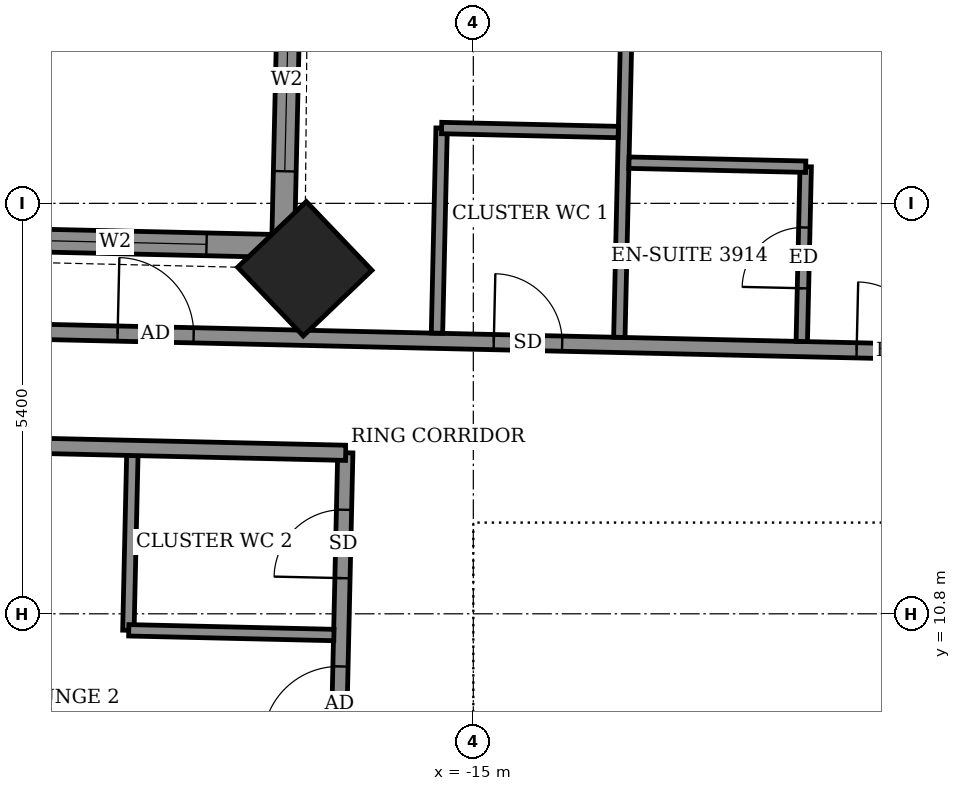
"""IFC4 building model, lengths in metres.
Left out: names, types, materials, properties, quantities, classifications, styles, units other than length and angle.
Written with IfcOpenShell. Run it as: python <this file> out.ifc"""

import sys

from ifc_helpers import new_model, si_unit, direction, frame, frame_2d, origin, origin_2d, place, context, subcontext, project, spatial, rectangle, extrude, element, fill, save


model = new_model("IFC4")
c1 = context("Model", 3, precision=1e-05, world=origin(), true_north=direction((0.0, 1.0)))
c2 = subcontext(c1, "Body", "Model", "MODEL_VIEW")
j1 = project(units=[si_unit("LENGTHUNIT", "METRE"), si_unit("PLANEANGLEUNIT", "RADIAN")], contexts=[c1])
p1 = place(None, origin())
s1 = spatial("IfcSite", under=j1, at=p1, CompositionType="ELEMENT")
p2 = place(p1, origin())
s2 = spatial("IfcBuilding", under=s1, at=p2, CompositionType="ELEMENT")
p3 = place(p2, frame((0.0, 0.0, 156.3)))
s3 = spatial("IfcBuildingStorey", under=s2, at=p3, CompositionType="ELEMENT", Elevation=156.3)
p4 = place(p3, frame((-17.217, 15.339, -0.55), z_axis=(0.0, 0.0, 1.0), x_axis=(-0.722976563275, -0.690872556232, 0.0)))
e1 = element("IfcColumn", 1, at=p4, inside=s3, PredefinedType="COLUMN", context=c2, shape_type="SweptSolid", body=[
    extrude(rectangle(XDim=1.25, YDim=1.25, at=origin_2d()), origin(), (0.0, 0.0, 1.0), 3.6),
])
p5 = place(p3, frame((-17.389, 20.637, 0.0), z_axis=(0.0, 0.0, 1.0), x_axis=(-0.022801259434, -0.999740017489, 0.0)))
e2 = element("IfcWall", 2, at=p5, inside=s3, PredefinedType="SOLIDWALL", context=c2, shape_type="SweptSolid", body=[
    extrude(rectangle(XDim=5.0, YDim=0.3, at=frame_2d((2.5, 0.0))), origin(), (0.0, 0.0, 1.0), 2.55),
])
p6 = place(p5, frame((1.616, 0.0, 0.9)))
e3 = element("IfcOpeningElement", 3, at=p6, cuts=e2, PredefinedType="OPENING", context=c2, shape_type="SweptSolid", body=[
    extrude(rectangle(XDim=2.4, YDim=1.5, at=frame_2d((1.2, 0.75))), frame((0.0, 0.16, 0.0), z_axis=(0.0, -1.0, 0.0), x_axis=(1.0, 0.0, 0.0)), (0.0, 0.0, 1.0), 0.32),
])
p7 = place(p3, frame((-17.503, 15.638, 0.0), z_axis=(0.0, 0.0, 1.0), x_axis=(-0.999744350543, 0.022610474516, 0.0)))
e4 = element("IfcWall", 4, at=p7, inside=s3, PredefinedType="SOLIDWALL", context=c2, shape_type="SweptSolid", body=[
    extrude(rectangle(XDim=4.999, YDim=0.3, at=frame_2d((2.5, 0.0))), origin(), (0.0, 0.0, 1.0), 2.55),
])
p8 = place(p7, frame((1.007, 0.0, 0.9)))
e5 = element("IfcOpeningElement", 5, at=p8, cuts=e4, PredefinedType="OPENING", context=c2, shape_type="SweptSolid", body=[
    extrude(rectangle(XDim=2.4, YDim=1.5, at=frame_2d((1.2, 0.75))), frame((0.0, 0.16, 0.0), z_axis=(0.0, -1.0, 0.0), x_axis=(1.0, 0.0, 0.0)), (0.0, 0.0, 1.0), 0.32),
])
p9 = place(p3, frame((-17.32, -15.098, 0.0), z_axis=(0.0, 0.0, 1.0), x_axis=(0.022694293906, 0.999742451346, 0.0)))
e6 = element("IfcWall", 6, at=p9, inside=s3, PredefinedType="PARTITIONING", context=c2, shape_type="SweptSolid", body=[
    extrude(rectangle(XDim=28.024, YDim=0.2, at=frame_2d((14.012, 0.0))), origin(), (0.0, 0.0, 1.0), 3.05),
])
p10 = place(p9, frame((24.212, 0.0, 0.0)))
e7 = element("IfcOpeningElement", 7, at=p10, cuts=e6, PredefinedType="OPENING", context=c2, shape_type="SweptSolid", body=[
    extrude(rectangle(XDim=1.0, YDim=2.1, at=frame_2d((0.5, 1.05))), frame((0.0, 0.11, 0.0), z_axis=(0.0, -1.0, 0.0), x_axis=(1.0, 0.0, 0.0)), (0.0, 0.0, 1.0), 0.22),
])
p11 = place(p9, frame((26.374, 0.0, 0.0)))
e8 = element("IfcOpeningElement", 8, at=p11, cuts=e6, PredefinedType="OPENING", context=c2, shape_type="SweptSolid", body=[
    extrude(rectangle(XDim=0.9, YDim=2.1, at=frame_2d((0.45, 1.05))), frame((0.0, 0.11, 0.0), z_axis=(0.0, -1.0, 0.0), x_axis=(1.0, 0.0, 0.0)), (0.0, 0.0, 1.0), 0.22),
])
p12 = place(p9, frame((21.774, 0.0, 0.0)))
e9 = element("IfcOpeningElement", 9, at=p12, cuts=e6, PredefinedType="OPENING", context=c2, shape_type="SweptSolid", body=[
    extrude(rectangle(XDim=1.0, YDim=2.1, at=frame_2d((0.5, 1.05))), frame((0.0, 0.11, 0.0), z_axis=(0.0, -1.0, 0.0), x_axis=(1.0, 0.0, 0.0)), (0.0, 0.0, 1.0), 0.22),
])
p13 = place(p9, frame((18.65, 0.0, 0.0)))
e10 = element("IfcOpeningElement", 10, at=p13, cuts=e6, PredefinedType="OPENING", context=c2, shape_type="SweptSolid", body=[
    extrude(rectangle(XDim=1.0, YDim=2.1, at=frame_2d((0.5, 1.05))), frame((0.0, 0.11, 0.0), z_axis=(0.0, -1.0, 0.0), x_axis=(1.0, 0.0, 0.0)), (0.0, 0.0, 1.0), 0.22),
])
p14 = place(p9, frame((15.626, 0.0, 0.0)))
e11 = element("IfcOpeningElement", 11, at=p14, cuts=e6, PredefinedType="OPENING", context=c2, shape_type="SweptSolid", body=[
    extrude(rectangle(XDim=1.0, YDim=2.1, at=frame_2d((0.5, 1.05))), frame((0.0, 0.11, 0.0), z_axis=(0.0, -1.0, 0.0), x_axis=(1.0, 0.0, 0.0)), (0.0, 0.0, 1.0), 0.22),
])
p15 = place(p9, frame((12.557, 0.0, 0.0)))
e12 = element("IfcOpeningElement", 12, at=p15, cuts=e6, PredefinedType="OPENING", context=c2, shape_type="SweptSolid", body=[
    extrude(rectangle(XDim=1.0, YDim=2.1, at=frame_2d((0.5, 1.05))), frame((0.0, 0.11, 0.0), z_axis=(0.0, -1.0, 0.0), x_axis=(1.0, 0.0, 0.0)), (0.0, 0.0, 1.0), 0.22),
])
p16 = place(p9, frame((10.049, 0.0, 0.0)))
e13 = element("IfcOpeningElement", 13, at=p16, cuts=e6, PredefinedType="OPENING", context=c2, shape_type="SweptSolid", body=[
    extrude(rectangle(XDim=1.0, YDim=2.1, at=frame_2d((0.5, 1.05))), frame((0.0, 0.11, 0.0), z_axis=(0.0, -1.0, 0.0), x_axis=(1.0, 0.0, 0.0)), (0.0, 0.0, 1.0), 0.22),
])
p17 = place(p9, frame((7.849, 0.0, 0.0)))
e14 = element("IfcOpeningElement", 14, at=p17, cuts=e6, PredefinedType="OPENING", context=c2, shape_type="SweptSolid", body=[
    extrude(rectangle(XDim=0.9, YDim=2.1, at=frame_2d((0.45, 1.05))), frame((0.0, 0.11, 0.0), z_axis=(0.0, -1.0, 0.0), x_axis=(1.0, 0.0, 0.0)), (0.0, 0.0, 1.0), 0.22),
])
p18 = place(p9, frame((4.199, 0.0, 0.0)))
e15 = element("IfcOpeningElement", 15, at=p18, cuts=e6, PredefinedType="OPENING", context=c2, shape_type="SweptSolid", body=[
    extrude(rectangle(XDim=1.0, YDim=2.1, at=frame_2d((0.5, 1.05))), frame((0.0, 0.11, 0.0), z_axis=(0.0, -1.0, 0.0), x_axis=(1.0, 0.0, 0.0)), (0.0, 0.0, 1.0), 0.22),
])
p19 = place(p9, frame((0.75, 0.0, 0.0)))
e16 = element("IfcOpeningElement", 16, at=p19, cuts=e6, PredefinedType="OPENING", context=c2, shape_type="SweptSolid", body=[
    extrude(rectangle(XDim=0.9, YDim=2.1, at=frame_2d((0.45, 1.05))), frame((0.0, 0.11, 0.0), z_axis=(0.0, -1.0, 0.0), x_axis=(1.0, 0.0, 0.0)), (0.0, 0.0, 1.0), 0.22),
])
p20 = place(p3, frame((-19.538, 10.583, 0.0), z_axis=(0.0, 0.0, 1.0), x_axis=(0.022612884682, 0.999744296031, 0.0)))
e17 = element("IfcWall", 17, at=p20, inside=s3, PredefinedType="PARTITIONING", context=c2, shape_type="SweptSolid", body=[
    extrude(rectangle(XDim=2.3, YDim=0.15, at=frame_2d((1.15, 0.0))), origin(), (0.0, 0.0, 1.0), 3.05),
])
p21 = place(p3, frame((-19.533, 10.583, 0.0), z_axis=(0.0, 0.0, 1.0), x_axis=(0.999736155505, -0.022969966847, 0.0)))
e18 = element("IfcWall", 18, at=p21, inside=s3, PredefinedType="PARTITIONING", context=c2, shape_type="SweptSolid", body=[
    extrude(rectangle(XDim=2.7, YDim=0.15, at=frame_2d((1.35, 0.0))), origin(), (0.0, 0.0, 1.0), 3.05),
])
p22 = place(p3, frame((-21.313, 13.024, 0.0), z_axis=(0.0, 0.0, 1.0), x_axis=(0.999738699021, -0.022858995594, 0.0)))
e19 = element("IfcWall", 19, at=p22, inside=s3, PredefinedType="PARTITIONING", context=c2, shape_type="SweptSolid", body=[
    extrude(rectangle(XDim=4.635, YDim=0.2, at=frame_2d((2.318, 0.0))), origin(), (0.0, 0.0, 1.0), 3.05),
])
p23 = place(p3, frame((-21.279, 14.523, 0.0), z_axis=(0.0, 0.0, 1.0), x_axis=(0.999742669174, -0.02268469602, 0.0)))
e20 = element("IfcWall", 20, at=p23, inside=s3, PredefinedType="PARTITIONING", context=c2, shape_type="SweptSolid", body=[
    extrude(rectangle(XDim=40.639, YDim=0.2, at=frame_2d((20.319, 0.0))), origin(), (0.0, 0.0, 1.0), 3.05),
])
p24 = place(p23, frame((37.65, 0.0, 0.0)))
e21 = element("IfcOpeningElement", 21, at=p24, cuts=e20, PredefinedType="OPENING", context=c2, shape_type="SweptSolid", body=[
    extrude(rectangle(XDim=0.9, YDim=2.1, at=frame_2d((0.45, 1.05))), frame((0.0, 0.11, 0.0), z_axis=(0.0, -1.0, 0.0), x_axis=(1.0, 0.0, 0.0)), (0.0, 0.0, 1.0), 0.22),
])
p25 = place(p23, frame((32.775, 0.0, 0.0)))
e22 = element("IfcOpeningElement", 22, at=p25, cuts=e20, PredefinedType="OPENING", context=c2, shape_type="SweptSolid", body=[
    extrude(rectangle(XDim=0.9, YDim=2.1, at=frame_2d((0.45, 1.05))), frame((0.0, 0.11, 0.0), z_axis=(0.0, -1.0, 0.0), x_axis=(1.0, 0.0, 0.0)), (0.0, 0.0, 1.0), 0.22),
])
p26 = place(p23, frame((30.4, 0.0, 0.0)))
e23 = element("IfcOpeningElement", 23, at=p26, cuts=e20, PredefinedType="OPENING", context=c2, shape_type="SweptSolid", body=[
    extrude(rectangle(XDim=0.9, YDim=2.1, at=frame_2d((0.45, 1.05))), frame((0.0, 0.11, 0.0), z_axis=(0.0, -1.0, 0.0), x_axis=(1.0, 0.0, 0.0)), (0.0, 0.0, 1.0), 0.22),
])
p27 = place(p23, frame((23.225, 0.0, 0.0)))
e24 = element("IfcOpeningElement", 24, at=p27, cuts=e20, PredefinedType="OPENING", context=c2, shape_type="SweptSolid", body=[
    extrude(rectangle(XDim=0.9, YDim=2.1, at=frame_2d((0.45, 1.05))), frame((0.0, 0.11, 0.0), z_axis=(0.0, -1.0, 0.0), x_axis=(1.0, 0.0, 0.0)), (0.0, 0.0, 1.0), 0.22),
])
p28 = place(p23, frame((20.85, 0.0, 0.0)))
e25 = element("IfcOpeningElement", 25, at=p28, cuts=e20, PredefinedType="OPENING", context=c2, shape_type="SweptSolid", body=[
    extrude(rectangle(XDim=0.9, YDim=2.1, at=frame_2d((0.45, 1.05))), frame((0.0, 0.11, 0.0), z_axis=(0.0, -1.0, 0.0), x_axis=(1.0, 0.0, 0.0)), (0.0, 0.0, 1.0), 0.22),
])
p29 = place(p23, frame((13.675, 0.0, 0.0)))
e26 = element("IfcOpeningElement", 26, at=p29, cuts=e20, PredefinedType="OPENING", context=c2, shape_type="SweptSolid", body=[
    extrude(rectangle(XDim=0.9, YDim=2.1, at=frame_2d((0.45, 1.05))), frame((0.0, 0.11, 0.0), z_axis=(0.0, -1.0, 0.0), x_axis=(1.0, 0.0, 0.0)), (0.0, 0.0, 1.0), 0.22),
])
p30 = place(p23, frame((11.325, 0.0, 0.0)))
e27 = element("IfcOpeningElement", 27, at=p30, cuts=e20, PredefinedType="OPENING", context=c2, shape_type="SweptSolid", body=[
    extrude(rectangle(XDim=0.9, YDim=2.1, at=frame_2d((0.45, 1.05))), frame((0.0, 0.11, 0.0), z_axis=(0.0, -1.0, 0.0), x_axis=(1.0, 0.0, 0.0)), (0.0, 0.0, 1.0), 0.22),
])
p31 = place(p23, frame((1.6, 0.0, 0.0)))
e28 = element("IfcOpeningElement", 28, at=p31, cuts=e20, PredefinedType="OPENING", context=c2, shape_type="SweptSolid", body=[
    extrude(rectangle(XDim=1.0, YDim=2.1, at=frame_2d((0.5, 1.05))), frame((0.0, 0.11, 0.0), z_axis=(0.0, -1.0, 0.0), x_axis=(1.0, 0.0, 0.0)), (0.0, 0.0, 1.0), 0.22),
])
p32 = place(p23, frame((6.55, 0.0, 0.0)))
e29 = element("IfcOpeningElement", 29, at=p32, cuts=e20, PredefinedType="OPENING", context=c2, shape_type="SweptSolid", body=[
    extrude(rectangle(XDim=0.9, YDim=2.1, at=frame_2d((0.45, 1.05))), frame((0.0, 0.11, 0.0), z_axis=(0.0, -1.0, 0.0), x_axis=(1.0, 0.0, 0.0)), (0.0, 0.0, 1.0), 0.22),
])
p33 = place(p3, frame((-15.478, 14.492, 0.0), z_axis=(0.0, 0.0, 1.0), x_axis=(0.02260842146, 0.999744396973, 0.0)))
e30 = element("IfcWall", 30, at=p33, inside=s3, PredefinedType="PARTITIONING", context=c2, shape_type="SweptSolid", body=[
    extrude(rectangle(XDim=2.7, YDim=0.15, at=frame_2d((1.35, 0.0))), origin(), (0.0, 0.0, 1.0), 3.05),
])
p34 = place(p3, frame((-13.079, 14.437, 0.0), z_axis=(0.0, 0.0, 1.0), x_axis=(0.022688785847, 0.999742576365, 0.0)))
e31 = element("IfcWall", 31, at=p34, inside=s3, PredefinedType="PARTITIONING", context=c2, shape_type="SweptSolid", body=[
    extrude(rectangle(XDim=5.95, YDim=0.15, at=frame_2d((2.975, 0.0))), origin(), (0.0, 0.0, 1.0), 2.55),
])
p35 = place(p3, frame((-10.679, 14.383, 0.0), z_axis=(0.0, 0.0, 1.0), x_axis=(0.022615284993, 0.999744241736, 0.0)))
e32 = element("IfcWall", 32, at=p35, inside=s3, PredefinedType="PARTITIONING", context=c2, shape_type="SweptSolid", body=[
    extrude(rectangle(XDim=2.299, YDim=0.15, at=frame_2d((1.15, 0.0))), origin(), (0.0, 0.0, 1.0), 3.05),
])
p36 = place(p35, frame((0.7, 0.0, 0.0)))
e33 = element("IfcOpeningElement", 33, at=p36, cuts=e32, PredefinedType="OPENING", context=c2, shape_type="SweptSolid", body=[
    extrude(rectangle(XDim=0.8, YDim=2.1, at=frame_2d((0.4, 1.05))), frame((0.0, 0.085, 0.0), z_axis=(0.0, -1.0, 0.0), x_axis=(1.0, 0.0, 0.0)), (0.0, 0.0, 1.0), 0.17),
])
p37 = place(p3, frame((-12.952, 16.735, 0.0), z_axis=(0.0, 0.0, 1.0), x_axis=(0.999738082346, -0.022885950011, 0.0)))
e34 = element("IfcWall", 34, at=p37, inside=s3, PredefinedType="PARTITIONING", context=c2, shape_type="SweptSolid", body=[
    extrude(rectangle(XDim=2.325, YDim=0.15, at=frame_2d((1.163, 0.0))), origin(), (0.0, 0.0, 1.0), 3.05),
])
p38 = place(p3, frame((-15.417, 17.191, 0.0), z_axis=(0.0, 0.0, 1.0), x_axis=(0.999740260747, -0.02279059109, 0.0)))
e35 = element("IfcWall", 35, at=p38, inside=s3, PredefinedType="PARTITIONING", context=c2, shape_type="SweptSolid", body=[
    extrude(rectangle(XDim=2.324, YDim=0.15, at=frame_2d((1.162, 0.0))), origin(), (0.0, 0.0, 1.0), 3.05),
])
p39 = place(p3, frame((-14.7, 11.25, 0.0), z_axis=(0.0, 0.0, 1.0), x_axis=(1.0, 0.0, 0.0)))
e36 = element("IfcWall", 36, at=p39, inside=s3, PredefinedType="SHEAR", context=c2, shape_type="SweptSolid", body=[
    extrude(rectangle(XDim=29.4, YDim=0.9, at=frame_2d((14.7, 0.0))), origin(), (0.0, 0.0, 1.0), 3.6),
])
p40 = place(p3, frame((-14.25, -10.8, 0.0), z_axis=(0.0, 0.0, 1.0), x_axis=(0.0, 1.0, 0.0)))
e37 = element("IfcWall", 37, at=p40, inside=s3, PredefinedType="SHEAR", context=c2, shape_type="SweptSolid", body=[
    extrude(rectangle(XDim=21.6, YDim=0.9, at=frame_2d((10.8, 0.0))), origin(), (0.0, 0.0, 1.0), 3.6),
])
p41 = place(p40, frame((8.25, 0.0, 0.0)))
e38 = element("IfcOpeningElement", 38, at=p41, cuts=e37, PredefinedType="OPENING", context=c2, shape_type="SweptSolid", body=[
    extrude(rectangle(XDim=1.2, YDim=2.1, at=frame_2d((0.6, 1.05))), frame((0.0, 0.46, 0.0), z_axis=(0.0, -1.0, 0.0), x_axis=(1.0, 0.0, 0.0)), (0.0, 0.0, 1.0), 0.92),
])
p42 = place(p40, frame((15.25, 0.0, 0.0)))
e39 = element("IfcOpeningElement", 39, at=p42, cuts=e37, PredefinedType="OPENING", context=c2, shape_type="SweptSolid", body=[
    extrude(rectangle(XDim=1.2, YDim=2.1, at=frame_2d((0.6, 1.05))), frame((0.0, 0.46, 0.0), z_axis=(0.0, -1.0, 0.0), x_axis=(1.0, 0.0, 0.0)), (0.0, 0.0, 1.0), 0.92),
])
p43 = place(p3, frame((-10.8, 8.2, 0.0), z_axis=(0.0, 0.0, 1.0), x_axis=(0.0, 1.0, 0.0)))
e40 = element("IfcWall", 40, at=p43, inside=s3, PredefinedType="STANDARD", context=c2, shape_type="SweptSolid", body=[
    extrude(rectangle(XDim=2.6, YDim=0.2, at=frame_2d((1.3, 0.0))), origin(), (0.0, 0.0, 1.0), 3.05),
])
p44 = place(p6, origin())
e41 = element("IfcWindow", 41, at=p44, inside=s3, PartitioningType="DOUBLE_PANEL_VERTICAL", PredefinedType="WINDOW", context=c2, shape_type="SweptSolid", body=[
    extrude(rectangle(XDim=2.4, YDim=1.5, at=frame_2d((1.2, 0.75))), frame((0.0, 0.03, 0.0), z_axis=(0.0, -1.0, 0.0), x_axis=(1.0, 0.0, 0.0)), (0.0, 0.0, 1.0), 0.06),
])
fill(e3, e41)
p45 = place(p8, origin())
e42 = element("IfcWindow", 42, at=p45, inside=s3, PartitioningType="DOUBLE_PANEL_VERTICAL", PredefinedType="WINDOW", context=c2, shape_type="SweptSolid", body=[
    extrude(rectangle(XDim=2.4, YDim=1.5, at=frame_2d((1.2, 0.75))), frame((0.0, 0.03, 0.0), z_axis=(0.0, -1.0, 0.0), x_axis=(1.0, 0.0, 0.0)), (0.0, 0.0, 1.0), 0.06),
])
fill(e5, e42)
p46 = place(p30, origin())
e43 = element("IfcDoor", 43, at=p46, inside=s3, OperationType="SINGLE_SWING_RIGHT", PredefinedType="DOOR", context=c2, shape_type="SweptSolid", body=[
    extrude(rectangle(XDim=0.9, YDim=2.1, at=frame_2d((0.45, 1.05))), frame((0.0, 0.025, 0.0), z_axis=(0.0, -1.0, 0.0), x_axis=(1.0, 0.0, 0.0)), (0.0, 0.0, 1.0), 0.05),
])
fill(e27, e43)
p47 = place(p36, origin())
e44 = element("IfcDoor", 44, at=p47, inside=s3, OperationType="SINGLE_SWING_RIGHT", PredefinedType="DOOR", context=c2, shape_type="SweptSolid", body=[
    extrude(rectangle(XDim=0.8, YDim=2.1, at=frame_2d((0.4, 1.05))), frame((0.0, 0.025, 0.0), z_axis=(0.0, -1.0, 0.0), x_axis=(1.0, 0.0, 0.0)), (0.0, 0.0, 1.0), 0.05),
])
fill(e33, e44)
p48 = place(p31, origin())
e45 = element("IfcDoor", 45, at=p48, inside=s3, OperationType="SINGLE_SWING_RIGHT", PredefinedType="DOOR", context=c2, shape_type="SweptSolid", body=[
    extrude(rectangle(XDim=1.0, YDim=2.1, at=frame_2d((0.5, 1.05))), frame((0.0, 0.025, 0.0), z_axis=(0.0, -1.0, 0.0), x_axis=(1.0, 0.0, 0.0)), (0.0, 0.0, 1.0), 0.05),
])
fill(e28, e45)
p49 = place(p32, origin())
e46 = element("IfcDoor", 46, at=p49, inside=s3, OperationType="SINGLE_SWING_RIGHT", PredefinedType="DOOR", context=c2, shape_type="SweptSolid", body=[
    extrude(rectangle(XDim=0.9, YDim=2.1, at=frame_2d((0.45, 1.05))), frame((0.0, 0.025, 0.0), z_axis=(0.0, -1.0, 0.0), x_axis=(1.0, 0.0, 0.0)), (0.0, 0.0, 1.0), 0.05),
])
fill(e29, e46)
p50 = place(p10, origin())
e47 = element("IfcDoor", 47, at=p50, inside=s3, OperationType="SINGLE_SWING_LEFT", PredefinedType="DOOR", context=c2, shape_type="SweptSolid", body=[
    extrude(rectangle(XDim=1.0, YDim=2.1, at=frame_2d((0.5, 1.05))), frame((0.0, 0.025, 0.0), z_axis=(0.0, -1.0, 0.0), x_axis=(1.0, 0.0, 0.0)), (0.0, 0.0, 1.0), 0.05),
])
fill(e7, e47)
p51 = place(p11, origin())
e48 = element("IfcDoor", 48, at=p51, inside=s3, OperationType="SINGLE_SWING_LEFT", PredefinedType="DOOR", context=c2, shape_type="SweptSolid", body=[
    extrude(rectangle(XDim=0.9, YDim=2.1, at=frame_2d((0.45, 1.05))), frame((0.0, 0.025, 0.0), z_axis=(0.0, -1.0, 0.0), x_axis=(1.0, 0.0, 0.0)), (0.0, 0.0, 1.0), 0.05),
])
fill(e8, e48)
save(model, sys.argv[1])
